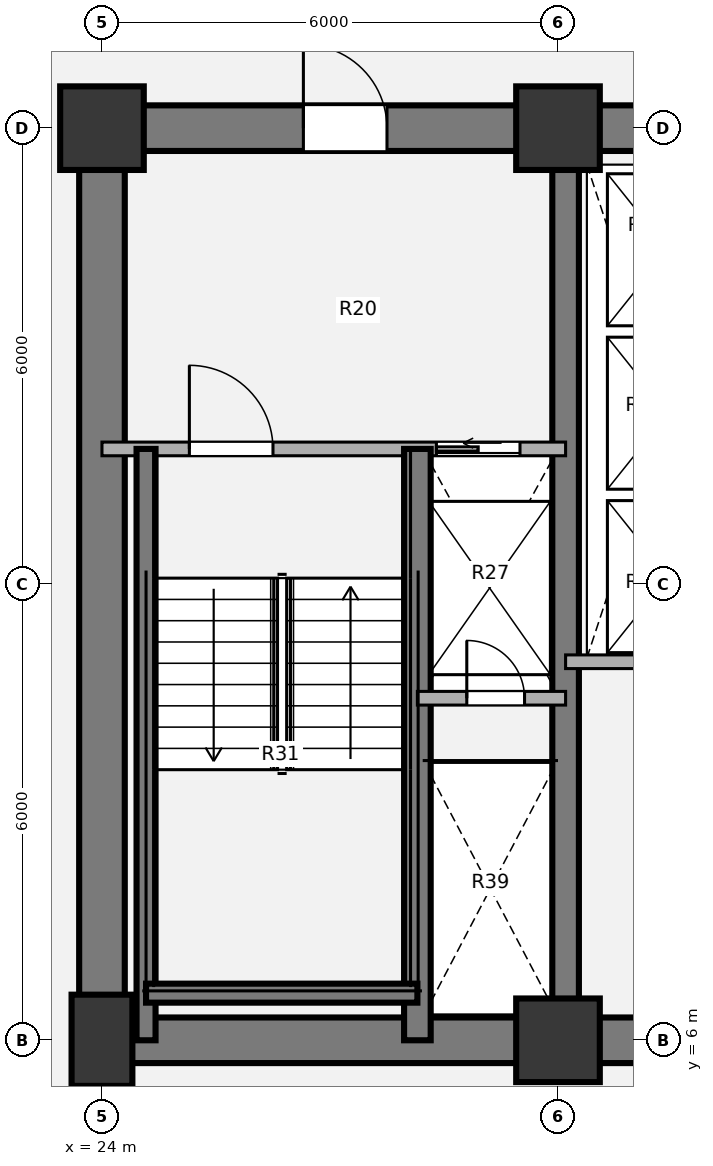
"""IFC4 building model, lengths in metres.
Left out: names, types, materials, properties, quantities, classifications, styles, units other than length and angle.
Written with IfcOpenShell. Run it as: python <this file> out.ifc"""

import sys

from ifc_helpers import new_model, si_unit, direction, frame, frame_2d, origin, origin_2d, place, context, subcontext, project, spatial, rectangle, extrude, source, transform, mapped, element, fill, save


model = new_model("IFC4")
c1 = context("Model", 3, precision=1e-05, world=origin(), true_north=direction((0.0, 1.0)))
c2 = subcontext(c1, "Body", "Model", "MODEL_VIEW")
j1 = project(units=[si_unit("LENGTHUNIT", "METRE"), si_unit("PLANEANGLEUNIT", "RADIAN")], contexts=[c1])
p1 = place(None, origin())
s1 = spatial("IfcSite", under=j1, at=p1, CompositionType="ELEMENT")
p2 = place(p1, origin())
s2 = spatial("IfcBuilding", under=s1, at=p2, CompositionType="ELEMENT")
p3 = place(p2, frame((0.0, 0.0, 76.14)))
s3 = spatial("IfcBuildingStorey", under=s2, at=p3, CompositionType="ELEMENT", Elevation=76.14)
m1 = source(origin(), c2, "Body", "SweptSolid", [
    extrude(rectangle(XDim=0.8, YDim=1.2, at=origin_2d()), origin(), (0.0, 0.0, 1.0), 3.78),
])
p4 = place(p3, frame((24.0, 6.0, 0.0), z_axis=(0.0, 0.0, 1.0), x_axis=(1.0, 0.0, 0.0)))
e1 = element("IfcColumn", 1, at=p4, inside=s3, PredefinedType="COLUMN", context=c2, shape_type="MappedRepresentation", body=[
    mapped(m1, transform((0.0, 0.0, 0.0), x_axis=(1.0, 0.0, 0.0), y_axis=(0.0, 1.0, 0.0), z_axis=(0.0, 0.0, 1.0), scale=1.0)),
])
m2 = source(origin(), c2, "Body", "SweptSolid", [
    extrude(rectangle(XDim=1.1, YDim=1.1, at=origin_2d()), origin(), (0.0, 0.0, 1.0), 3.78),
])
for number, where, z_axis, x_axis in (
    (2, (30.0, 6.0, 0.0), (0.0, 0.0, 1.0), (1.0, 0.0, 0.0)),
    (3, (24.0, 18.0, 0.0), (0.0, 0.0, 1.0), (1.0, 0.0, 0.0)),
    (4, (30.0, 18.0, 0.0), (0.0, 0.0, 1.0), (1.0, 0.0, 0.0)),
):
    element("IfcColumn", number, at=place(p3, frame(where, z_axis=z_axis, x_axis=x_axis)), inside=s3, PredefinedType="COLUMN", context=c2, shape_type="MappedRepresentation", body=[
        mapped(m2, transform((0.0, 0.0, 0.0), x_axis=(1.0, 0.0, 0.0), y_axis=(0.0, 1.0, 0.0), z_axis=(0.0, 0.0, 1.0), scale=1.0)),
    ])
p5 = place(p3, frame((48.3, 6.0, 0.0), z_axis=(0.0, 0.0, 1.0), x_axis=(-1.0, 0.0, 0.0)))
e5 = element("IfcWall", 5, at=p5, inside=s3, PredefinedType="SHEAR", context=c2, shape_type="SweptSolid", body=[
    extrude(rectangle(XDim=24.6, YDim=0.6, at=frame_2d((12.3, 0.0))), origin(), (0.0, 0.0, 1.0), 3.78),
])
p6 = place(p3, frame((24.0, 6.0, 0.0), z_axis=(0.0, 0.0, 1.0), x_axis=(0.0, 1.0, 0.0)))
e6 = element("IfcWall", 6, at=p6, inside=s3, PredefinedType="SHEAR", context=c2, shape_type="SweptSolid", body=[
    extrude(rectangle(XDim=12.0, YDim=0.6, at=frame_2d((6.0, 0.0))), origin(), (0.0, 0.0, 1.0), 3.78),
])
p7 = place(p3, frame((23.7, 18.0, 0.0), z_axis=(0.0, 0.0, 1.0), x_axis=(1.0, 0.0, 0.0)))
e7 = element("IfcWall", 7, at=p7, inside=s3, PredefinedType="SHEAR", context=c2, shape_type="SweptSolid", body=[
    extrude(rectangle(XDim=9.5, YDim=0.6, at=frame_2d((4.75, 0.0))), origin(), (0.0, 0.0, 1.0), 3.78),
])
p8 = place(p7, frame((2.95, 0.0, 0.0)))
e8 = element("IfcOpeningElement", 8, at=p8, cuts=e7, PredefinedType="OPENING", context=c2, shape_type="SweptSolid", body=[
    extrude(rectangle(XDim=1.1, YDim=2.1, at=origin_2d()), frame((0.55, 0.31, 1.05), z_axis=(0.0, -1.0, 0.0), x_axis=(1.0, 0.0, 0.0)), (0.0, 0.0, 1.0), 0.62),
])
p9 = place(p3, frame((30.1, 6.0, 0.0), z_axis=(0.0, 0.0, 1.0), x_axis=(0.0, 1.0, 0.0)))
e9 = element("IfcWall", 9, at=p9, inside=s3, PredefinedType="SHEAR", context=c2, shape_type="SweptSolid", body=[
    extrude(rectangle(XDim=12.0, YDim=0.35, at=frame_2d((6.0, 0.0))), origin(), (0.0, 0.0, 1.0), 3.78),
])
p10 = place(p3, frame((30.1, 10.98, 0.0), z_axis=(0.0, 0.0, 1.0), x_axis=(1.0, 0.0, 0.0)))
e10 = element("IfcWall", 10, at=p10, inside=s3, PredefinedType="PARTITIONING", context=c2, shape_type="SweptSolid", body=[
    extrude(rectangle(XDim=4.08, YDim=0.18, at=frame_2d((2.04, 0.0))), origin(), (0.0, 0.0, 1.0), 3.342),
])
p11 = place(p3, frame((24.0, 13.78, 0.0), z_axis=(0.0, 0.0, 1.0), x_axis=(1.0, 0.0, 0.0)))
e11 = element("IfcWall", 11, at=p11, inside=s3, PredefinedType="PARTITIONING", context=c2, shape_type="SweptSolid", body=[
    extrude(rectangle(XDim=6.1, YDim=0.18, at=frame_2d((3.05, 0.0))), origin(), (0.0, 0.0, 1.0), 3.342),
])
p12 = place(p11, frame((1.15, 0.0, 0.0)))
e12 = element("IfcOpeningElement", 12, at=p12, cuts=e11, PredefinedType="OPENING", context=c2, shape_type="SweptSolid", body=[
    extrude(rectangle(XDim=1.1, YDim=2.1, at=origin_2d()), frame((0.55, 0.1, 1.05), z_axis=(0.0, -1.0, 0.0), x_axis=(1.0, 0.0, 0.0)), (0.0, 0.0, 1.0), 0.2),
])
p13 = place(p11, frame((4.4, 0.0, 0.0)))
e13 = element("IfcOpeningElement", 13, at=p13, cuts=e11, PredefinedType="OPENING", context=c2, shape_type="SweptSolid", body=[
    extrude(rectangle(XDim=1.1, YDim=2.1, at=origin_2d()), frame((0.55, 0.1, 1.05), z_axis=(0.0, -1.0, 0.0), x_axis=(1.0, 0.0, 0.0)), (0.0, 0.0, 1.0), 0.2),
])
p14 = place(p3, frame((28.15, 6.0, 0.0), z_axis=(0.0, 0.0, 1.0), x_axis=(0.0, 1.0, 0.0)))
e14 = element("IfcWall", 14, at=p14, inside=s3, PredefinedType="SHEAR", context=c2, shape_type="SweptSolid", body=[
    extrude(rectangle(XDim=7.78, YDim=0.35, at=frame_2d((3.89, 0.0))), origin(), (0.0, 0.0, 1.0), 3.692),
])
p15 = place(p3, frame((24.58, 6.0, 0.0), z_axis=(0.0, 0.0, 1.0), x_axis=(0.0, 1.0, 0.0)))
e15 = element("IfcWall", 15, at=p15, inside=s3, PredefinedType="SHEAR", context=c2, shape_type="SweptSolid", body=[
    extrude(rectangle(XDim=7.78, YDim=0.25, at=frame_2d((3.89, 0.0))), origin(), (0.0, 0.0, 1.0), 3.692),
])
p16 = place(p3, frame((24.58, 6.62, 0.0), z_axis=(0.0, 0.0, 1.0), x_axis=(1.0, 0.0, 0.0)))
e16 = element("IfcWall", 16, at=p16, inside=s3, PredefinedType="SHEAR", context=c2, shape_type="SweptSolid", body=[
    extrude(rectangle(XDim=3.57, YDim=0.25, at=frame_2d((1.785, 0.0))), origin(), (0.0, 0.0, 1.0), 3.692),
])
p17 = place(p3, frame((28.15, 10.5, 0.0), z_axis=(0.0, 0.0, 1.0), x_axis=(1.0, 0.0, 0.0)))
e17 = element("IfcWall", 17, at=p17, inside=s3, PredefinedType="PARTITIONING", context=c2, shape_type="SweptSolid", body=[
    extrude(rectangle(XDim=1.95, YDim=0.18, at=frame_2d((0.975, 0.0))), origin(), (0.0, 0.0, 1.0), 3.342),
])
p18 = place(p17, frame((0.65, 0.0, 0.0)))
e18 = element("IfcOpeningElement", 18, at=p18, cuts=e17, PredefinedType="OPENING", context=c2, shape_type="SweptSolid", body=[
    extrude(rectangle(XDim=0.76, YDim=2.05, at=origin_2d()), frame((0.38, 0.1, 1.025), z_axis=(0.0, -1.0, 0.0), x_axis=(1.0, 0.0, 0.0)), (0.0, 0.0, 1.0), 0.2),
])
m3 = source(origin(), c2, "Body", "SweptSolid", [
    extrude(rectangle(XDim=1.1, YDim=2.1, at=origin_2d()), frame((0.55, 0.025, 1.05), z_axis=(0.0, -1.0, 0.0), x_axis=(1.0, 0.0, 0.0)), (0.0, 0.0, 1.0), 0.05),
])
p19 = place(p12, origin())
e19 = element("IfcDoor", 19, at=p19, inside=s3, OperationType="SINGLE_SWING_LEFT", PredefinedType="DOOR", context=c2, shape_type="MappedRepresentation", body=[
    mapped(m3, transform((0.0, 0.0, 0.0), x_axis=(1.0, 0.0, 0.0), y_axis=(0.0, 1.0, 0.0), z_axis=(0.0, 0.0, 1.0), scale=1.0)),
])
fill(e12, e19)
m4 = source(origin(), c2, "Body", "SweptSolid", [
    extrude(rectangle(XDim=1.1, YDim=2.1, at=origin_2d()), frame((0.55, 0.025, 1.05), z_axis=(0.0, -1.0, 0.0), x_axis=(1.0, 0.0, 0.0)), (0.0, 0.0, 1.0), 0.05),
])
p20 = place(p13, origin())
e20 = element("IfcDoor", 20, at=p20, inside=s3, OperationType="SLIDING_TO_LEFT", PredefinedType="DOOR", context=c2, shape_type="MappedRepresentation", body=[
    mapped(m4, transform((0.0, 0.0, 0.0), x_axis=(1.0, 0.0, 0.0), y_axis=(0.0, 1.0, 0.0), z_axis=(0.0, 0.0, 1.0), scale=1.0)),
])
fill(e13, e20)
m5 = source(origin(), c2, "Body", "SweptSolid", [
    extrude(rectangle(XDim=0.76, YDim=2.05, at=origin_2d()), frame((0.38, 0.025, 1.025), z_axis=(0.0, -1.0, 0.0), x_axis=(1.0, 0.0, 0.0)), (0.0, 0.0, 1.0), 0.05),
])
p21 = place(p18, origin())
e21 = element("IfcDoor", 21, at=p21, inside=s3, OperationType="SINGLE_SWING_LEFT", PredefinedType="DOOR", context=c2, shape_type="MappedRepresentation", body=[
    mapped(m5, transform((0.0, 0.0, 0.0), x_axis=(1.0, 0.0, 0.0), y_axis=(0.0, 1.0, 0.0), z_axis=(0.0, 0.0, 1.0), scale=1.0)),
])
fill(e18, e21)
m6 = source(origin(), c2, "Body", "SweptSolid", [
    extrude(rectangle(XDim=1.1, YDim=2.1, at=origin_2d()), frame((0.55, 0.025, 1.05), z_axis=(0.0, -1.0, 0.0), x_axis=(1.0, 0.0, 0.0)), (0.0, 0.0, 1.0), 0.05),
])
p22 = place(p8, origin())
e22 = element("IfcDoor", 22, at=p22, inside=s3, OperationType="SINGLE_SWING_LEFT", PredefinedType="DOOR", context=c2, shape_type="MappedRepresentation", body=[
    mapped(m6, transform((0.0, 0.0, 0.0), x_axis=(1.0, 0.0, 0.0), y_axis=(0.0, 1.0, 0.0), z_axis=(0.0, 0.0, 1.0), scale=1.0)),
])
fill(e8, e22)
save(model, sys.argv[1])
